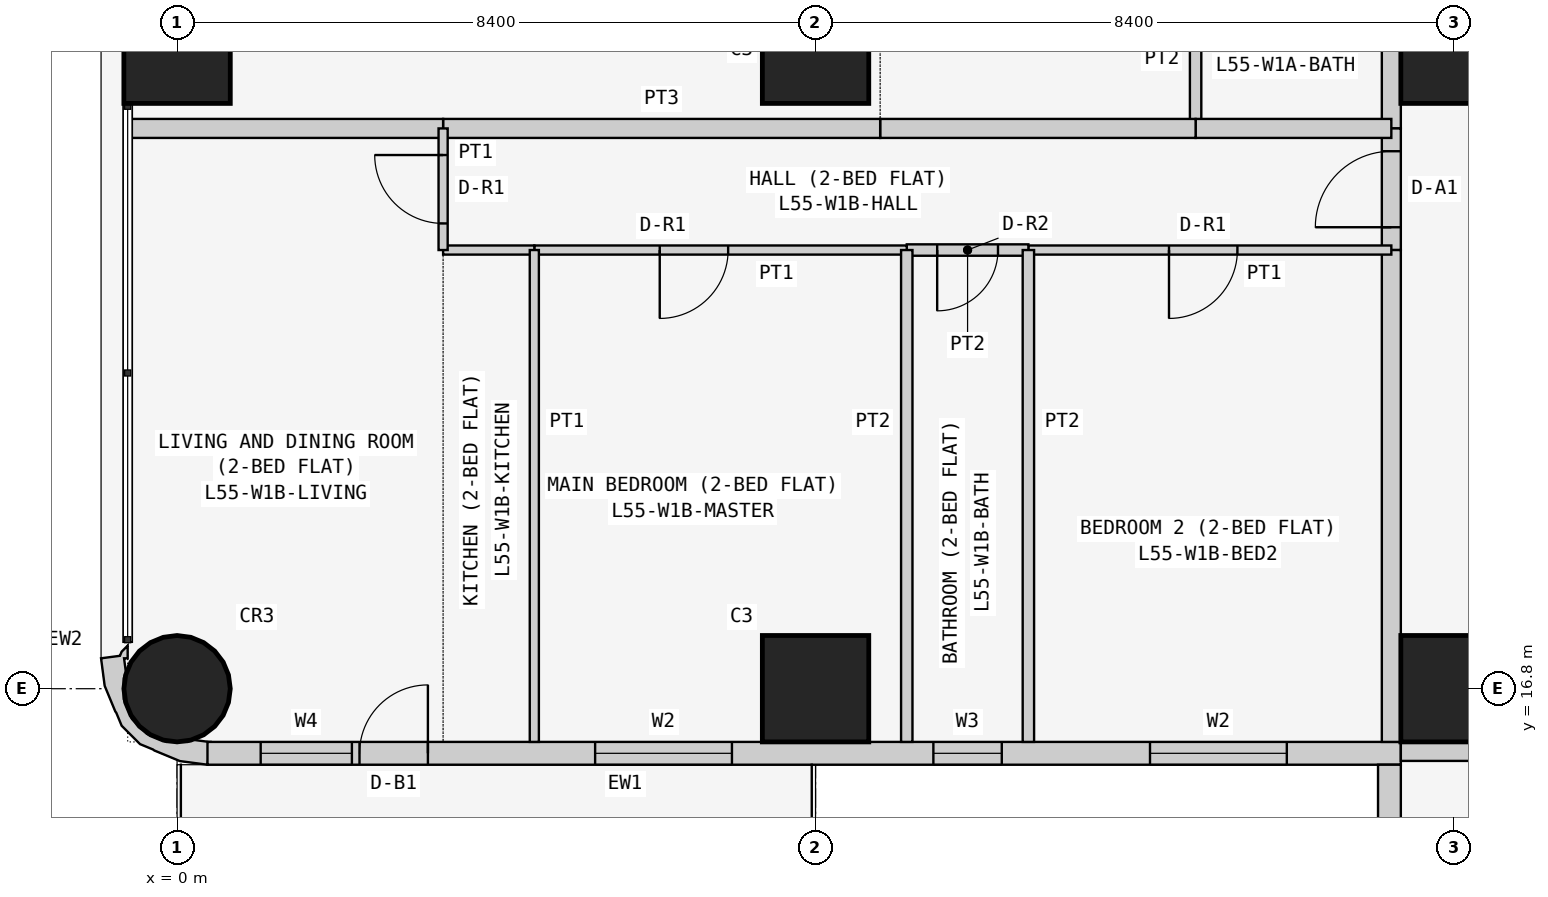
"""IFC4 building model, lengths in metres.
Left out: names, types, materials, properties, quantities, classifications, styles, units other than length and angle.
Written with IfcOpenShell. Run it as: python <this file> out.ifc"""

import sys

from ifc_helpers import new_model, si_unit, direction, frame, frame_2d, origin, origin_2d, place, context, subcontext, project, spatial, polyline, rectangle, circle, outline, extrude, element, fill, save


model = new_model("IFC4")
c1 = context("Model", 3, precision=1e-05, world=origin(), true_north=direction((0.0, 1.0)))
c2 = subcontext(c1, "Body", "Model", "MODEL_VIEW")
j1 = project(units=[si_unit("LENGTHUNIT", "METRE"), si_unit("PLANEANGLEUNIT", "RADIAN")], contexts=[c1])
p1 = place(None, origin())
s1 = spatial("IfcSite", under=j1, at=p1, CompositionType="ELEMENT")
p2 = place(p1, origin())
s2 = spatial("IfcBuilding", under=s1, at=p2, CompositionType="ELEMENT")
p3 = place(p2, frame((0.0, 0.0, 212.1)))
s3 = spatial("IfcBuildingStorey", under=s2, at=p3, CompositionType="ELEMENT", Elevation=212.1)
p4 = place(p3, frame((0.0, 16.8, 0.0), z_axis=(0.0, 0.0, 1.0), x_axis=(1.0, 0.0, 0.0)))
e1 = element("IfcColumn", 1, at=p4, inside=s3, PredefinedType="COLUMN", context=c2, shape_type="SweptSolid", body=[
    extrude(circle(Radius=0.7, at=origin_2d()), origin(), (0.0, 0.0, 1.0), 3.6),
])
for number, where, z_axis, x_axis in (
    (2, (0.0, 25.2, 0.0), (0.0, 0.0, 1.0), (1.0, 0.0, 0.0)),
    (3, (8.4, 16.8, 0.0), (0.0, 0.0, 1.0), (1.0, 0.0, 0.0)),
    (4, (8.4, 25.2, 0.0), (0.0, 0.0, 1.0), (1.0, 0.0, 0.0)),
    (5, (16.8, 16.8, 0.0), (0.0, 0.0, 1.0), (1.0, 0.0, 0.0)),
    (6, (16.8, 25.2, 0.0), (0.0, 0.0, 1.0), (1.0, 0.0, 0.0)),
):
    element("IfcColumn", number, at=place(p3, frame(where, z_axis=z_axis, x_axis=x_axis)), inside=s3, PredefinedType="COLUMN", context=c2, shape_type="SweptSolid", body=[
        extrude(rectangle(XDim=1.4, YDim=1.4, at=origin_2d()), origin(), (0.0, 0.0, 1.0), 3.6),
    ])
p5 = place(p3, frame((0.4, 15.95, 0.0), z_axis=(0.0, 0.0, 1.0), x_axis=(1.0, 0.0, 0.0)))
e7 = element("IfcWall", 7, at=p5, inside=s3, PredefinedType="SOLIDWALL", context=c2, shape_type="SweptSolid", body=[
    extrude(rectangle(XDim=15.7, YDim=0.3, at=frame_2d((7.85, 0.0))), origin(), (0.0, 0.0, 1.0), 3.45),
])
p6 = place(p5, frame((12.4, 0.0, 0.9)))
e8 = element("IfcOpeningElement", 8, at=p6, cuts=e7, PredefinedType="OPENING", context=c2, shape_type="SweptSolid", body=[
    extrude(rectangle(XDim=1.8, YDim=1.5, at=frame_2d((0.9, 0.75))), frame((0.0, 0.16, 0.0), z_axis=(0.0, -1.0, 0.0), x_axis=(1.0, 0.0, 0.0)), (0.0, 0.0, 1.0), 0.32),
])
p7 = place(p5, frame((9.55, 0.0, 1.5)))
e9 = element("IfcOpeningElement", 9, at=p7, cuts=e7, PredefinedType="OPENING", context=c2, shape_type="SweptSolid", body=[
    extrude(rectangle(XDim=0.9, YDim=0.7, at=frame_2d((0.45, 0.35))), frame((0.0, 0.16, 0.0), z_axis=(0.0, -1.0, 0.0), x_axis=(1.0, 0.0, 0.0)), (0.0, 0.0, 1.0), 0.32),
])
p8 = place(p5, frame((5.1, 0.0, 0.9)))
e10 = element("IfcOpeningElement", 10, at=p8, cuts=e7, PredefinedType="OPENING", context=c2, shape_type="SweptSolid", body=[
    extrude(rectangle(XDim=1.8, YDim=1.5, at=frame_2d((0.9, 0.75))), frame((0.0, 0.16, 0.0), z_axis=(0.0, -1.0, 0.0), x_axis=(1.0, 0.0, 0.0)), (0.0, 0.0, 1.0), 0.32),
])
p9 = place(p5, frame((2.0, 0.0, 0.0)))
e11 = element("IfcOpeningElement", 11, at=p9, cuts=e7, PredefinedType="OPENING", context=c2, shape_type="SweptSolid", body=[
    extrude(rectangle(XDim=0.9, YDim=2.4, at=frame_2d((0.45, 1.2))), frame((0.0, 0.16, 0.0), z_axis=(0.0, -1.0, 0.0), x_axis=(1.0, 0.0, 0.0)), (0.0, 0.0, 1.0), 0.32),
])
p10 = place(p5, frame((0.7, 0.0, 0.9)))
e12 = element("IfcOpeningElement", 12, at=p10, cuts=e7, PredefinedType="OPENING", context=c2, shape_type="SweptSolid", body=[
    extrude(rectangle(XDim=1.2, YDim=1.5, at=frame_2d((0.6, 0.75))), frame((0.0, 0.16, 0.0), z_axis=(0.0, -1.0, 0.0), x_axis=(1.0, 0.0, 0.0)), (0.0, 0.0, 1.0), 0.32),
])
p11 = place(p3, frame((15.95, 15.8, 0.0), z_axis=(0.0, 0.0, 1.0), x_axis=(0.0, -1.0, 0.0)))
e13 = element("IfcWall", 13, at=p11, inside=s3, PredefinedType="SOLIDWALL", context=c2, shape_type="SweptSolid", body=[
    extrude(rectangle(XDim=7.0, YDim=0.3, at=frame_2d((3.5, 0.0))), origin(), (0.0, 0.0, 1.0), 3.45),
])
p12 = place(p11, frame((1.5, 0.0, 0.9)))
e14 = element("IfcOpeningElement", 14, at=p12, cuts=e13, PredefinedType="OPENING", context=c2, shape_type="SweptSolid", body=[
    extrude(rectangle(XDim=2.4, YDim=1.5, at=frame_2d((1.2, 0.75))), frame((0.0, 0.16, 0.0), z_axis=(0.0, -1.0, 0.0), x_axis=(1.0, 0.0, 0.0)), (0.0, 0.0, 1.0), 0.32),
])
p13 = place(p11, frame((5.05, 0.0, 0.9)))
e15 = element("IfcOpeningElement", 15, at=p13, cuts=e13, PredefinedType="OPENING", context=c2, shape_type="SweptSolid", body=[
    extrude(rectangle(XDim=1.2, YDim=1.5, at=frame_2d((0.6, 0.75))), frame((0.0, 0.16, 0.0), z_axis=(0.0, -1.0, 0.0), x_axis=(1.0, 0.0, 0.0)), (0.0, 0.0, 1.0), 0.32),
])
p14 = place(p3, frame((-0.588, 17.312, 0.0), z_axis=(0.0, 0.0, 1.0), x_axis=(-0.898030234854, -0.439933741929, 0.0)))
e16 = element("IfcWall", 16, at=p14, inside=s3, PredefinedType="SOLIDWALL", context=c2, shape_type="SweptSolid", body=[
    extrude(outline(polyline([(-0.222, 1.793), (-0.39, 1.541), (-0.372, 1.532), (-0.195, 1.415), (-0.12, 1.41), (0.131, 1.287), (0.315, 1.078), (0.406, 0.814), (0.388, 0.536), (0.265, 0.285), (0.209, 0.236), (0.148, 0.053), (0.105, 0.074), (0.032, -0.076), (0.138, -0.039), (0.182, -0.0), (0.419, -0.08), (0.536, 0.266), (0.559, 0.631), (0.555, 0.651), (0.566, 0.836), (0.456, 1.159), (0.333, 1.298), (0.324, 1.316), (0.082, 1.591), (-0.222, 1.793)])), origin(), (0.0, 0.0, 1.0), 3.45),
])
p15 = place(p3, frame((22.971, 15.975, 0.0), z_axis=(0.0, 0.0, 1.0), x_axis=(-1.0, 0.0, 0.0)))
e17 = element("IfcWall", 17, at=p15, inside=s3, PredefinedType="PARTITIONING", context=c2, shape_type="SweptSolid", body=[
    extrude(rectangle(XDim=6.871, YDim=0.25, at=frame_2d((3.436, 0.0))), origin(), (0.0, 0.0, 1.0), 3.45),
])
p16 = place(p3, frame((15.975, 24.171, 0.0), z_axis=(0.0, 0.0, 1.0), x_axis=(0.0, 1.0, 0.0)))
e18 = element("IfcWall", 18, at=p16, inside=s3, PredefinedType="PARTITIONING", context=c2, shape_type="SweptSolid", body=[
    extrude(rectangle(XDim=2.629, YDim=0.25, at=frame_2d((1.314, 0.0))), origin(), (0.0, 0.0, 1.0), 3.45),
])
p17 = place(p3, frame((15.975, 22.571, 0.0), z_axis=(0.0, 0.0, 1.0), x_axis=(0.0, 1.0, 0.0)))
e19 = element("IfcWall", 19, at=p17, inside=s3, PredefinedType="PARTITIONING", context=c2, shape_type="SweptSolid", body=[
    extrude(rectangle(XDim=1.6, YDim=0.25, at=frame_2d((0.8, 0.0))), origin(), (0.0, 0.0, 1.0), 3.45),
])
p18 = place(p17, frame((0.3, 0.0, 0.0)))
e20 = element("IfcOpeningElement", 20, at=p18, cuts=e19, PredefinedType="OPENING", context=c2, shape_type="SweptSolid", body=[
    extrude(rectangle(XDim=1.0, YDim=2.1, at=frame_2d((0.5, 1.05))), frame((0.0, 0.135, 0.0), z_axis=(0.0, -1.0, 0.0), x_axis=(1.0, 0.0, 0.0)), (0.0, 0.0, 1.0), 0.27),
])
p19 = place(p3, frame((15.975, 16.1, 0.0), z_axis=(0.0, 0.0, 1.0), x_axis=(0.0, 1.0, 0.0)))
e21 = element("IfcWall", 21, at=p19, inside=s3, PredefinedType="PARTITIONING", context=c2, shape_type="SweptSolid", body=[
    extrude(rectangle(XDim=6.471, YDim=0.25, at=frame_2d((3.235, 0.0))), origin(), (0.0, 0.0, 1.0), 3.45),
])
p20 = place(p3, frame((13.4, 26.8, 0.0), z_axis=(0.0, 0.0, 1.0), x_axis=(0.0, -1.0, 0.0)))
e22 = element("IfcWall", 22, at=p20, inside=s3, PredefinedType="PARTITIONING", context=c2, shape_type="SweptSolid", body=[
    extrude(rectangle(XDim=2.629, YDim=0.15, at=frame_2d((1.314, 0.0))), origin(), (0.0, 0.0, 1.0), 3.45),
])
p21 = place(p3, frame((13.4, 24.171, 0.0), z_axis=(0.0, 0.0, 1.0), x_axis=(1.0, 0.0, 0.0)))
e23 = element("IfcWall", 23, at=p21, inside=s3, PredefinedType="PARTITIONING", context=c2, shape_type="SweptSolid", body=[
    extrude(rectangle(XDim=2.575, YDim=0.25, at=frame_2d((1.288, 0.0))), origin(), (0.0, 0.0, 1.0), 3.45),
])
p22 = place(p3, frame((9.25, 24.171, 0.0), z_axis=(0.0, 0.0, 1.0), x_axis=(1.0, 0.0, 0.0)))
e24 = element("IfcWall", 24, at=p22, inside=s3, PredefinedType="PARTITIONING", context=c2, shape_type="SweptSolid", body=[
    extrude(rectangle(XDim=4.15, YDim=0.25, at=frame_2d((2.075, 0.0))), origin(), (0.0, 0.0, 1.0), 3.45),
])
p23 = place(p3, frame((3.5, 24.171, 0.0), z_axis=(0.0, 0.0, 1.0), x_axis=(1.0, 0.0, 0.0)))
e25 = element("IfcWall", 25, at=p23, inside=s3, PredefinedType="PARTITIONING", context=c2, shape_type="SweptSolid", body=[
    extrude(rectangle(XDim=5.75, YDim=0.25, at=frame_2d((2.875, 0.0))), origin(), (0.0, 0.0, 1.0), 3.45),
])
p24 = place(p3, frame((-0.65, 24.171, 0.0), z_axis=(0.0, 0.0, 1.0), x_axis=(1.0, 0.0, 0.0)))
e26 = element("IfcWall", 26, at=p24, inside=s3, PredefinedType="PARTITIONING", context=c2, shape_type="SweptSolid", body=[
    extrude(rectangle(XDim=4.15, YDim=0.25, at=frame_2d((2.075, 0.0))), origin(), (0.0, 0.0, 1.0), 3.45),
])
p25 = place(p3, frame((11.2, 22.571, 0.0), z_axis=(0.0, 0.0, 1.0), x_axis=(1.0, 0.0, 0.0)))
e27 = element("IfcWall", 27, at=p25, inside=s3, PredefinedType="PARTITIONING", context=c2, shape_type="SweptSolid", body=[
    extrude(rectangle(XDim=4.775, YDim=0.12, at=frame_2d((2.388, 0.0))), origin(), (0.0, 0.0, 1.0), 3.45),
])
p26 = place(p25, frame((1.85, 0.0, 0.0)))
e28 = element("IfcOpeningElement", 28, at=p26, cuts=e27, PredefinedType="OPENING", context=c2, shape_type="SweptSolid", body=[
    extrude(rectangle(XDim=0.9, YDim=2.1, at=frame_2d((0.45, 1.05))), frame((0.0, 0.07, 0.0), z_axis=(0.0, -1.0, 0.0), x_axis=(1.0, 0.0, 0.0)), (0.0, 0.0, 1.0), 0.14),
])
p27 = place(p3, frame((9.6, 22.571, 0.0), z_axis=(0.0, 0.0, 1.0), x_axis=(1.0, 0.0, 0.0)))
e29 = element("IfcWall", 29, at=p27, inside=s3, PredefinedType="PARTITIONING", context=c2, shape_type="SweptSolid", body=[
    extrude(rectangle(XDim=1.6, YDim=0.15, at=frame_2d((0.8, 0.0))), origin(), (0.0, 0.0, 1.0), 3.45),
])
p28 = place(p27, frame((0.4, 0.0, 0.0)))
e30 = element("IfcOpeningElement", 30, at=p28, cuts=e29, PredefinedType="OPENING", context=c2, shape_type="SweptSolid", body=[
    extrude(rectangle(XDim=0.8, YDim=2.1, at=frame_2d((0.4, 1.05))), frame((0.0, 0.085, 0.0), z_axis=(0.0, -1.0, 0.0), x_axis=(1.0, 0.0, 0.0)), (0.0, 0.0, 1.0), 0.17),
])
p29 = place(p3, frame((4.7, 22.571, 0.0), z_axis=(0.0, 0.0, 1.0), x_axis=(1.0, 0.0, 0.0)))
e31 = element("IfcWall", 31, at=p29, inside=s3, PredefinedType="PARTITIONING", context=c2, shape_type="SweptSolid", body=[
    extrude(rectangle(XDim=4.9, YDim=0.12, at=frame_2d((2.45, 0.0))), origin(), (0.0, 0.0, 1.0), 3.45),
])
p30 = place(p29, frame((1.65, 0.0, 0.0)))
e32 = element("IfcOpeningElement", 32, at=p30, cuts=e31, PredefinedType="OPENING", context=c2, shape_type="SweptSolid", body=[
    extrude(rectangle(XDim=0.9, YDim=2.1, at=frame_2d((0.45, 1.05))), frame((0.0, 0.07, 0.0), z_axis=(0.0, -1.0, 0.0), x_axis=(1.0, 0.0, 0.0)), (0.0, 0.0, 1.0), 0.14),
])
p31 = place(p3, frame((3.5, 22.571, 0.0), z_axis=(0.0, 0.0, 1.0), x_axis=(1.0, 0.0, 0.0)))
e33 = element("IfcWall", 33, at=p31, inside=s3, PredefinedType="PARTITIONING", context=c2, shape_type="SweptSolid", body=[
    extrude(rectangle(XDim=1.2, YDim=0.12, at=frame_2d((0.6, 0.0))), origin(), (0.0, 0.0, 1.0), 3.45),
])
p32 = place(p3, frame((3.5, 24.171, 0.0), z_axis=(0.0, 0.0, 1.0), x_axis=(0.0, -1.0, 0.0)))
e34 = element("IfcWall", 34, at=p32, inside=s3, PredefinedType="PARTITIONING", context=c2, shape_type="SweptSolid", body=[
    extrude(rectangle(XDim=1.6, YDim=0.12, at=frame_2d((0.8, 0.0))), origin(), (0.0, 0.0, 1.0), 3.45),
])
p33 = place(p32, frame((0.35, 0.0, 0.0)))
e35 = element("IfcOpeningElement", 35, at=p33, cuts=e34, PredefinedType="OPENING", context=c2, shape_type="SweptSolid", body=[
    extrude(rectangle(XDim=0.9, YDim=2.1, at=frame_2d((0.45, 1.05))), frame((0.0, 0.07, 0.0), z_axis=(0.0, -1.0, 0.0), x_axis=(1.0, 0.0, 0.0)), (0.0, 0.0, 1.0), 0.14),
])
for number, where, z_axis, x_axis in (
    (36, (11.2, 22.571, 0.0), (0.0, 0.0, 1.0), (0.0, -1.0, 0.0)),
    (37, (9.6, 22.571, 0.0), (0.0, 0.0, 1.0), (0.0, -1.0, 0.0)),
):
    element("IfcWall", number, at=place(p3, frame(where, z_axis=z_axis, x_axis=x_axis)), inside=s3, PredefinedType="PARTITIONING", context=c2, shape_type="SweptSolid", body=[
        extrude(rectangle(XDim=6.471, YDim=0.15, at=frame_2d((3.235, 0.0))), origin(), (0.0, 0.0, 1.0), 3.45),
    ])
p34 = place(p3, frame((4.7, 22.571, 0.0), z_axis=(0.0, 0.0, 1.0), x_axis=(0.0, -1.0, 0.0)))
e38 = element("IfcWall", 38, at=p34, inside=s3, PredefinedType="PARTITIONING", context=c2, shape_type="SweptSolid", body=[
    extrude(rectangle(XDim=6.471, YDim=0.12, at=frame_2d((3.235, 0.0))), origin(), (0.0, 0.0, 1.0), 3.45),
])
p35 = place(p6, origin())
e39 = element("IfcWindow", 39, at=p35, inside=s3, PartitioningType="SINGLE_PANEL", PredefinedType="WINDOW", context=c2, shape_type="SweptSolid", body=[
    extrude(rectangle(XDim=1.8, YDim=1.5, at=frame_2d((0.9, 0.75))), frame((0.0, 0.03, 0.0), z_axis=(0.0, -1.0, 0.0), x_axis=(1.0, 0.0, 0.0)), (0.0, 0.0, 1.0), 0.06),
])
fill(e8, e39)
p36 = place(p7, origin())
e40 = element("IfcWindow", 40, at=p36, inside=s3, PartitioningType="SINGLE_PANEL", PredefinedType="WINDOW", context=c2, shape_type="SweptSolid", body=[
    extrude(rectangle(XDim=0.9, YDim=0.7, at=frame_2d((0.45, 0.35))), frame((0.0, 0.03, 0.0), z_axis=(0.0, -1.0, 0.0), x_axis=(1.0, 0.0, 0.0)), (0.0, 0.0, 1.0), 0.06),
])
fill(e9, e40)
p37 = place(p8, origin())
e41 = element("IfcWindow", 41, at=p37, inside=s3, PartitioningType="SINGLE_PANEL", PredefinedType="WINDOW", context=c2, shape_type="SweptSolid", body=[
    extrude(rectangle(XDim=1.8, YDim=1.5, at=frame_2d((0.9, 0.75))), frame((0.0, 0.03, 0.0), z_axis=(0.0, -1.0, 0.0), x_axis=(1.0, 0.0, 0.0)), (0.0, 0.0, 1.0), 0.06),
])
fill(e10, e41)
p38 = place(p9, origin())
e42 = element("IfcDoor", 42, at=p38, inside=s3, OperationType="SINGLE_SWING_RIGHT", PredefinedType="DOOR", context=c2, shape_type="SweptSolid", body=[
    extrude(rectangle(XDim=0.9, YDim=2.4, at=frame_2d((0.45, 1.2))), frame((0.0, 0.025, 0.0), z_axis=(0.0, -1.0, 0.0), x_axis=(1.0, 0.0, 0.0)), (0.0, 0.0, 1.0), 0.05),
])
fill(e11, e42)
p39 = place(p10, origin())
e43 = element("IfcWindow", 43, at=p39, inside=s3, PartitioningType="SINGLE_PANEL", PredefinedType="WINDOW", context=c2, shape_type="SweptSolid", body=[
    extrude(rectangle(XDim=1.2, YDim=1.5, at=frame_2d((0.6, 0.75))), frame((0.0, 0.03, 0.0), z_axis=(0.0, -1.0, 0.0), x_axis=(1.0, 0.0, 0.0)), (0.0, 0.0, 1.0), 0.06),
])
fill(e12, e43)
p40 = place(p18, origin())
e44 = element("IfcDoor", 44, at=p40, inside=s3, OperationType="SINGLE_SWING_LEFT", PredefinedType="DOOR", context=c2, shape_type="SweptSolid", body=[
    extrude(rectangle(XDim=1.0, YDim=2.1, at=frame_2d((0.5, 1.05))), frame((0.0, 0.025, 0.0), z_axis=(0.0, -1.0, 0.0), x_axis=(1.0, 0.0, 0.0)), (0.0, 0.0, 1.0), 0.05),
])
fill(e20, e44)
p41 = place(p26, frame((0.9, 0.0, 0.0), z_axis=(0.0, 0.0, 1.0), x_axis=(-1.0, 0.0, 0.0)))
e45 = element("IfcDoor", 45, at=p41, inside=s3, OperationType="SINGLE_SWING_RIGHT", PredefinedType="DOOR", context=c2, shape_type="SweptSolid", body=[
    extrude(rectangle(XDim=0.9, YDim=2.1, at=frame_2d((0.45, 1.05))), frame((0.0, 0.025, 0.0), z_axis=(0.0, -1.0, 0.0), x_axis=(1.0, 0.0, 0.0)), (0.0, 0.0, 1.0), 0.05),
])
fill(e28, e45)
p42 = place(p28, frame((0.8, 0.0, 0.0), z_axis=(0.0, 0.0, 1.0), x_axis=(-1.0, 0.0, 0.0)))
e46 = element("IfcDoor", 46, at=p42, inside=s3, OperationType="SINGLE_SWING_RIGHT", PredefinedType="DOOR", context=c2, shape_type="SweptSolid", body=[
    extrude(rectangle(XDim=0.8, YDim=2.1, at=frame_2d((0.4, 1.05))), frame((0.0, 0.025, 0.0), z_axis=(0.0, -1.0, 0.0), x_axis=(1.0, 0.0, 0.0)), (0.0, 0.0, 1.0), 0.05),
])
fill(e30, e46)
p43 = place(p30, frame((0.9, 0.0, 0.0), z_axis=(0.0, 0.0, 1.0), x_axis=(-1.0, 0.0, 0.0)))
e47 = element("IfcDoor", 47, at=p43, inside=s3, OperationType="SINGLE_SWING_RIGHT", PredefinedType="DOOR", context=c2, shape_type="SweptSolid", body=[
    extrude(rectangle(XDim=0.9, YDim=2.1, at=frame_2d((0.45, 1.05))), frame((0.0, 0.025, 0.0), z_axis=(0.0, -1.0, 0.0), x_axis=(1.0, 0.0, 0.0)), (0.0, 0.0, 1.0), 0.05),
])
fill(e32, e47)
p44 = place(p33, frame((0.9, 0.0, 0.0), z_axis=(0.0, 0.0, 1.0), x_axis=(-1.0, 0.0, 0.0)))
e48 = element("IfcDoor", 48, at=p44, inside=s3, OperationType="SINGLE_SWING_RIGHT", PredefinedType="DOOR", context=c2, shape_type="SweptSolid", body=[
    extrude(rectangle(XDim=0.9, YDim=2.1, at=frame_2d((0.45, 1.05))), frame((0.0, 0.025, 0.0), z_axis=(0.0, -1.0, 0.0), x_axis=(1.0, 0.0, 0.0)), (0.0, 0.0, 1.0), 0.05),
])
fill(e35, e48)
save(model, sys.argv[1])
